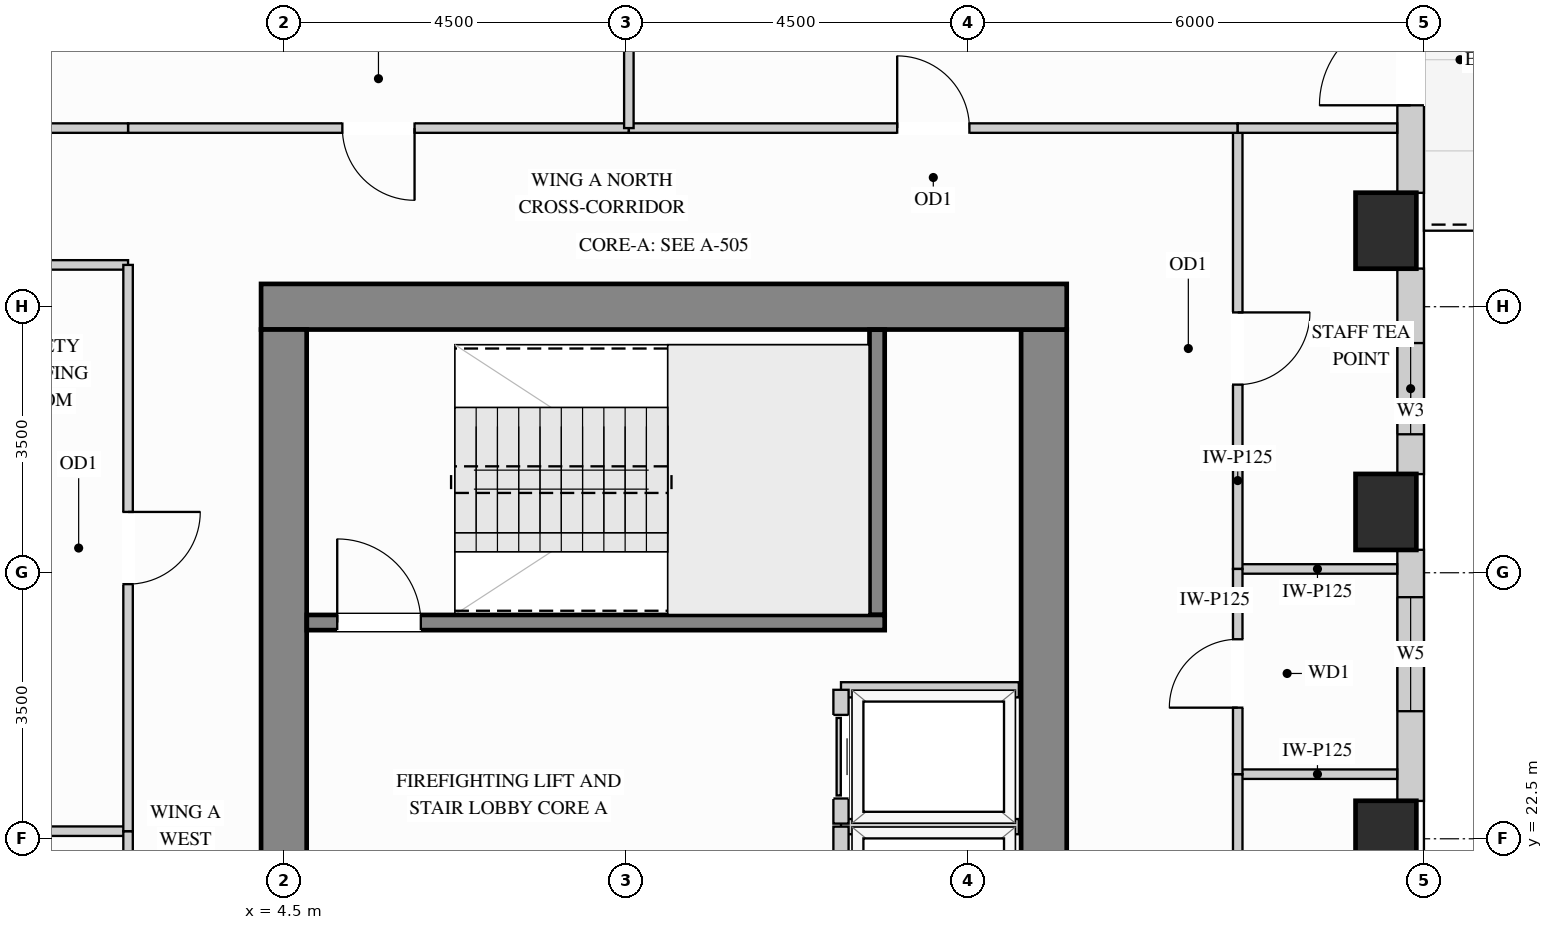
"""IFC4 building model, lengths in metres.
Left out: names, types, materials, properties, quantities, classifications, styles, units other than length and angle.
Written with IfcOpenShell. Run it as: python <this file> out.ifc"""

import sys

from ifc_helpers import new_model, si_unit, direction, frame, frame_2d, origin, origin_2d, place, context, subcontext, project, spatial, rectangle, extrude, source, transform, mapped, element, fill, save


model = new_model("IFC4")
c1 = context("Model", 3, precision=1e-05, world=origin(), true_north=direction((0.0, 1.0)))
c2 = subcontext(c1, "Body", "Model", "MODEL_VIEW")
j1 = project(units=[si_unit("LENGTHUNIT", "METRE"), si_unit("PLANEANGLEUNIT", "RADIAN")], contexts=[c1])
p1 = place(None, origin())
s1 = spatial("IfcSite", under=j1, at=p1, CompositionType="ELEMENT")
p2 = place(p1, origin())
s2 = spatial("IfcBuilding", under=s1, at=p2, CompositionType="ELEMENT")
p3 = place(p2, frame((0.0, 0.0, 157.5)))
s3 = spatial("IfcBuildingStorey", under=s2, at=p3, CompositionType="ELEMENT", Elevation=157.5)
m1 = source(origin(), c2, "Body", "SweptSolid", [
    extrude(rectangle(XDim=0.8, YDim=1.0, at=origin_2d()), origin(), (0.0, 0.0, 1.0), 3.4),
])
for number, where, z_axis, x_axis in (
    (1, (19.0, 22.5, 0.0), (0.0, 0.0, 1.0), (1.0, 0.0, 0.0)),
    (2, (19.0, 26.8, 0.0), (0.0, 0.0, 1.0), (1.0, 0.0, 0.0)),
    (3, (19.0, 30.5, 0.0), (0.0, 0.0, 1.0), (1.0, 0.0, 0.0)),
):
    element("IfcColumn", number, at=place(p3, frame(where, z_axis=z_axis, x_axis=x_axis)), inside=s3, PredefinedType="COLUMN", context=c2, shape_type="MappedRepresentation", body=[
        mapped(m1, transform((0.0, 0.0, 0.0), x_axis=(1.0, 0.0, 0.0), y_axis=(0.0, 1.0, 0.0), z_axis=(0.0, 0.0, 1.0))),
    ])
m2 = source(origin(), c2, "Body", "SweptSolid", [
    extrude(rectangle(XDim=8.32, YDim=0.6, at=frame_2d((4.16, 0.0))), origin(), (0.0, 0.0, 1.0), 3.4),
])
p4 = place(p3, frame((14.5, 20.88, 0.0), z_axis=(0.0, 0.0, 1.0), x_axis=(0.0, 1.0, 0.0)))
e4 = element("IfcWall", 4, at=p4, inside=s3, PredefinedType="SHEAR", context=c2, shape_type="MappedRepresentation", body=[
    mapped(m2, transform((0.0, 0.0, 0.0), x_axis=(1.0, 0.0, 0.0), y_axis=(0.0, 1.0, 0.0), z_axis=(0.0, 0.0, 1.0))),
])
m3 = source(origin(), c2, "Body", "SweptSolid", [
    extrude(rectangle(XDim=10.6, YDim=0.6, at=frame_2d((5.3, 0.0))), origin(), (0.0, 0.0, 1.0), 3.4),
])
p5 = place(p3, frame((4.2, 29.5, 0.0), z_axis=(0.0, 0.0, 1.0), x_axis=(1.0, 0.0, 0.0)))
e5 = element("IfcWall", 5, at=p5, inside=s3, PredefinedType="SHEAR", context=c2, shape_type="MappedRepresentation", body=[
    mapped(m3, transform((0.0, 0.0, 0.0), x_axis=(1.0, 0.0, 0.0), y_axis=(0.0, 1.0, 0.0), z_axis=(0.0, 0.0, 1.0))),
])
m4 = source(origin(), c2, "Body", "SweptSolid", [
    extrude(rectangle(XDim=20.4, YDim=0.6, at=frame_2d((10.2, 0.0))), origin(), (0.0, 0.0, 1.0), 3.4),
])
p6 = place(p3, frame((4.5, 8.8, 0.0), z_axis=(0.0, 0.0, 1.0), x_axis=(0.0, 1.0, 0.0)))
e6 = element("IfcWall", 6, at=p6, inside=s3, PredefinedType="SHEAR", context=c2, shape_type="MappedRepresentation", body=[
    mapped(m4, transform((0.0, 0.0, 0.0), x_axis=(1.0, 0.0, 0.0), y_axis=(0.0, 1.0, 0.0), z_axis=(0.0, 0.0, 1.0))),
])
p7 = place(p3, frame((19.325, 22.998, 0.0), z_axis=(0.0, 0.0, 1.0), x_axis=(0.0, 1.0, 0.0)))
e7 = element("IfcWall", 7, at=p7, inside=s3, PredefinedType="SOLIDWALL", context=c2, shape_type="SweptSolid", body=[
    extrude(rectangle(XDim=3.304, YDim=0.35, at=frame_2d((1.652, 0.0))), origin(), (0.0, 0.0, 1.0), 2.612),
])
p8 = place(p7, frame((1.18, 0.0, 0.78)))
e8 = element("IfcOpeningElement", 8, at=p8, cuts=e7, PredefinedType="OPENING", context=c2, shape_type="SweptSolid", body=[
    extrude(rectangle(XDim=1.5, YDim=1.652, at=frame_2d((0.75, 0.826))), frame((0.0, 0.185, 0.0), z_axis=(0.0, -1.0, 0.0), x_axis=(1.0, 0.0, 0.0)), (0.0, 0.0, 1.0), 0.37),
])
p9 = place(p3, frame((19.325, 27.298, 0.0), z_axis=(0.0, 0.0, 1.0), x_axis=(0.0, 1.0, 0.0)))
e9 = element("IfcWall", 9, at=p9, inside=s3, PredefinedType="SOLIDWALL", context=c2, shape_type="SweptSolid", body=[
    extrude(rectangle(XDim=2.704, YDim=0.35, at=frame_2d((1.352, 0.0))), origin(), (0.0, 0.0, 1.0), 2.612),
])
p10 = place(p9, frame((0.524, 0.0, 0.78)))
e10 = element("IfcOpeningElement", 10, at=p10, cuts=e9, PredefinedType="OPENING", context=c2, shape_type="SweptSolid", body=[
    extrude(rectangle(XDim=1.2, YDim=1.652, at=frame_2d((0.6, 0.826))), frame((0.0, 0.185, 0.0), z_axis=(0.0, -1.0, 0.0), x_axis=(1.0, 0.0, 0.0)), (0.0, 0.0, 1.0), 0.37),
])
p11 = place(p3, frame((19.325, 30.998, 0.0), z_axis=(0.0, 0.0, 1.0), x_axis=(0.0, 1.0, 0.0)))
e11 = element("IfcWall", 11, at=p11, inside=s3, PredefinedType="SOLIDWALL", context=c2, shape_type="SweptSolid", body=[
    extrude(rectangle(XDim=3.504, YDim=0.35, at=frame_2d((1.752, 0.0))), origin(), (0.0, 0.0, 1.0), 2.612),
])
p12 = place(p11, frame((1.152, 0.0, 0.0)))
e12 = element("IfcOpeningElement", 12, at=p12, cuts=e11, PredefinedType="OPENING", context=c2, shape_type="SweptSolid", body=[
    extrude(rectangle(XDim=1.2, YDim=2.15, at=frame_2d((0.6, 1.075))), frame((0.0, 0.185, 0.0), z_axis=(0.0, -1.0, 0.0), x_axis=(1.0, 0.0, 0.0)), (0.0, 0.0, 1.0), 0.37),
])
m5 = source(origin(), c2, "Body", "SweptSolid", [
    extrude(rectangle(XDim=2.098, YDim=0.125, at=frame_2d((1.049, 0.0))), origin(), (0.0, 0.0, 1.0), 3.385),
])
for number, where, z_axis, x_axis in (
    (13, (17.05, 23.35, 0.0), (0.0, 0.0, 1.0), (1.0, 0.0, 0.0)),
    (14, (17.05, 26.05, 0.0), (0.0, 0.0, 1.0), (1.0, 0.0, 0.0)),
):
    element("IfcWall", number, at=place(p3, frame(where, z_axis=z_axis, x_axis=x_axis)), inside=s3, PredefinedType="PARTITIONING", context=c2, shape_type="MappedRepresentation", body=[
        mapped(m5, transform((0.0, 0.0, 0.0), x_axis=(1.0, 0.0, 0.0), y_axis=(0.0, 1.0, 0.0), z_axis=(0.0, 0.0, 1.0))),
    ])
p13 = place(p3, frame((17.05, 16.7, 0.0), z_axis=(0.0, 0.0, 1.0), x_axis=(0.0, 1.0, 0.0)))
e15 = element("IfcWall", 15, at=p13, inside=s3, PredefinedType="PARTITIONING", context=c2, shape_type="SweptSolid", body=[
    extrude(rectangle(XDim=6.65, YDim=0.125, at=frame_2d((3.325, 0.0))), origin(), (0.0, 0.0, 1.0), 3.385),
])
p14 = place(p13, frame((2.85, 0.0, 0.0)))
e16 = element("IfcOpeningElement", 16, at=p14, cuts=e15, PredefinedType="OPENING", context=c2, shape_type="SweptSolid", body=[
    extrude(rectangle(XDim=0.95, YDim=2.15, at=frame_2d((0.475, 1.075))), frame((0.0, 0.073, 0.0), z_axis=(0.0, -1.0, 0.0), x_axis=(1.0, 0.0, 0.0)), (0.0, 0.0, 1.0), 0.145),
])
p15 = place(p3, frame((17.05, 26.05, 0.0), z_axis=(0.0, 0.0, 1.0), x_axis=(0.0, 1.0, 0.0)))
e17 = element("IfcWall", 17, at=p15, inside=s3, PredefinedType="PARTITIONING", context=c2, shape_type="SweptSolid", body=[
    extrude(rectangle(XDim=5.8, YDim=0.125, at=frame_2d((2.9, 0.0))), origin(), (0.0, 0.0, 1.0), 3.385),
])
p16 = place(p15, frame((2.425, 0.0, 0.0)))
e18 = element("IfcOpeningElement", 18, at=p16, cuts=e17, PredefinedType="OPENING", context=c2, shape_type="SweptSolid", body=[
    extrude(rectangle(XDim=0.95, YDim=2.15, at=frame_2d((0.475, 1.075))), frame((0.0, 0.073, 0.0), z_axis=(0.0, -1.0, 0.0), x_axis=(1.0, 0.0, 0.0)), (0.0, 0.0, 1.0), 0.145),
])
p17 = place(p3, frame((17.05, 23.35, 0.0), z_axis=(0.0, 0.0, 1.0), x_axis=(0.0, 1.0, 0.0)))
e19 = element("IfcWall", 19, at=p17, inside=s3, PredefinedType="PARTITIONING", context=c2, shape_type="SweptSolid", body=[
    extrude(rectangle(XDim=2.7, YDim=0.125, at=frame_2d((1.35, 0.0))), origin(), (0.0, 0.0, 1.0), 3.385),
])
p18 = place(p17, frame((0.875, 0.0, 0.0)))
e20 = element("IfcOpeningElement", 20, at=p18, cuts=e19, PredefinedType="OPENING", context=c2, shape_type="SweptSolid", body=[
    extrude(rectangle(XDim=0.9, YDim=2.15, at=frame_2d((0.45, 1.075))), frame((0.0, 0.073, 0.0), z_axis=(0.0, -1.0, 0.0), x_axis=(1.0, 0.0, 0.0)), (0.0, 0.0, 1.0), 0.145),
])
p19 = place(p3, frame((2.45, 31.85, 0.0), z_axis=(0.0, 0.0, 1.0), x_axis=(1.0, 0.0, 0.0)))
e21 = element("IfcWall", 21, at=p19, inside=s3, PredefinedType="PARTITIONING", context=c2, shape_type="SweptSolid", body=[
    extrude(rectangle(XDim=6.589, YDim=0.125, at=frame_2d((3.294, 0.0))), origin(), (0.0, 0.0, 1.0), 2.848),
])
p20 = place(p19, frame((2.82, 0.0, 0.0)))
e22 = element("IfcOpeningElement", 22, at=p20, cuts=e21, PredefinedType="OPENING", context=c2, shape_type="SweptSolid", body=[
    extrude(rectangle(XDim=0.95, YDim=2.15, at=frame_2d((0.475, 1.075))), frame((0.0, 0.073, 0.0), z_axis=(0.0, -1.0, 0.0), x_axis=(1.0, 0.0, 0.0)), (0.0, 0.0, 1.0), 0.145),
])
p21 = place(p3, frame((9.039, 31.85, 0.0), z_axis=(0.0, 0.0, 1.0), x_axis=(1.0, 0.0, 0.0)))
e23 = element("IfcWall", 23, at=p21, inside=s3, PredefinedType="PARTITIONING", context=c2, shape_type="SweptSolid", body=[
    extrude(rectangle(XDim=8.011, YDim=0.125, at=frame_2d((4.005, 0.0))), origin(), (0.0, 0.0, 1.0), 2.848),
])
p22 = place(p21, frame((3.531, 0.0, 0.0)))
e24 = element("IfcOpeningElement", 24, at=p22, cuts=e23, PredefinedType="OPENING", context=c2, shape_type="SweptSolid", body=[
    extrude(rectangle(XDim=0.95, YDim=2.15, at=frame_2d((0.475, 1.075))), frame((0.0, 0.073, 0.0), z_axis=(0.0, -1.0, 0.0), x_axis=(1.0, 0.0, 0.0)), (0.0, 0.0, 1.0), 0.145),
])
m6 = source(origin(), c2, "Body", "SweptSolid", [
    extrude(rectangle(XDim=2.098, YDim=0.125, at=frame_2d((1.049, 0.0))), origin(), (0.0, 0.0, 1.0), 2.848),
])
for number, where, z_axis, x_axis in (
    (25, (17.05, 31.85, 0.0), (0.0, 0.0, 1.0), (1.0, 0.0, 0.0)),
    (26, (0.352, 31.85, 0.0), (0.0, 0.0, 1.0), (1.0, 0.0, 0.0)),
):
    element("IfcWall", number, at=place(p3, frame(where, z_axis=z_axis, x_axis=x_axis)), inside=s3, PredefinedType="PARTITIONING", context=c2, shape_type="MappedRepresentation", body=[
        mapped(m6, transform((0.0, 0.0, 0.0), x_axis=(1.0, 0.0, 0.0), y_axis=(0.0, 1.0, 0.0), z_axis=(0.0, 0.0, 1.0))),
    ])
m7 = source(origin(), c2, "Body", "SweptSolid", [
    extrude(rectangle(XDim=5.53, YDim=0.125, at=frame_2d((2.765, 0.0))), origin(), (0.0, 0.0, 1.0), 3.385),
])
p23 = place(p3, frame((9.039, 31.85, 0.0), z_axis=(0.0, 0.0, 1.0), x_axis=(0.0, 1.0, 0.0)))
e27 = element("IfcWall", 27, at=p23, inside=s3, PredefinedType="PARTITIONING", context=c2, shape_type="MappedRepresentation", body=[
    mapped(m7, transform((0.0, 0.0, 0.0), x_axis=(1.0, 0.0, 0.0), y_axis=(0.0, 1.0, 0.0), z_axis=(0.0, 0.0, 1.0))),
])
m8 = source(origin(), c2, "Body", "SweptSolid", [
    extrude(rectangle(XDim=1.33, YDim=0.125, at=frame_2d((0.665, 0.0))), origin(), (0.0, 0.0, 1.0), 3.385),
])
for number, where, z_axis, x_axis in (
    (28, (1.12, 30.05, 0.0), (0.0, 0.0, 1.0), (1.0, 0.0, 0.0)),
    (29, (1.12, 22.6, 0.0), (0.0, 0.0, 1.0), (1.0, 0.0, 0.0)),
):
    element("IfcWall", number, at=place(p3, frame(where, z_axis=z_axis, x_axis=x_axis)), inside=s3, PredefinedType="PARTITIONING", context=c2, shape_type="MappedRepresentation", body=[
        mapped(m8, transform((0.0, 0.0, 0.0), x_axis=(1.0, 0.0, 0.0), y_axis=(0.0, 1.0, 0.0), z_axis=(0.0, 0.0, 1.0))),
    ])
p24 = place(p3, frame((2.45, 15.1, 0.0), z_axis=(0.0, 0.0, 1.0), x_axis=(0.0, 1.0, 0.0)))
e30 = element("IfcWall", 30, at=p24, inside=s3, PredefinedType="PARTITIONING", context=c2, shape_type="SweptSolid", body=[
    extrude(rectangle(XDim=7.5, YDim=0.125, at=frame_2d((3.75, 0.0))), origin(), (0.0, 0.0, 1.0), 3.385),
])
p25 = place(p24, frame((3.275, 0.0, 0.0)))
e31 = element("IfcOpeningElement", 31, at=p25, cuts=e30, PredefinedType="OPENING", context=c2, shape_type="SweptSolid", body=[
    extrude(rectangle(XDim=0.95, YDim=2.15, at=frame_2d((0.475, 1.075))), frame((0.0, 0.073, 0.0), z_axis=(0.0, -1.0, 0.0), x_axis=(1.0, 0.0, 0.0)), (0.0, 0.0, 1.0), 0.145),
])
p26 = place(p3, frame((2.45, 22.6, 0.0), z_axis=(0.0, 0.0, 1.0), x_axis=(0.0, 1.0, 0.0)))
e32 = element("IfcWall", 32, at=p26, inside=s3, PredefinedType="PARTITIONING", context=c2, shape_type="SweptSolid", body=[
    extrude(rectangle(XDim=7.45, YDim=0.125, at=frame_2d((3.725, 0.0))), origin(), (0.0, 0.0, 1.0), 3.385),
])
p27 = place(p26, frame((3.25, 0.0, 0.0)))
e33 = element("IfcOpeningElement", 33, at=p27, cuts=e32, PredefinedType="OPENING", context=c2, shape_type="SweptSolid", body=[
    extrude(rectangle(XDim=0.95, YDim=2.15, at=frame_2d((0.475, 1.075))), frame((0.0, 0.073, 0.0), z_axis=(0.0, -1.0, 0.0), x_axis=(1.0, 0.0, 0.0)), (0.0, 0.0, 1.0), 0.145),
])
m9 = source(origin(), c2, "Body", "SweptSolid", [
    extrude(rectangle(XDim=2.34, YDim=0.2, at=frame_2d((1.17, 0.0))), origin(), (0.0, 0.0, 1.0), 3.385),
])
p28 = place(p3, frame((11.83, 22.66, 0.0), z_axis=(0.0, 0.0, 1.0), x_axis=(1.0, 0.0, 0.0)))
e34 = element("IfcWall", 34, at=p28, inside=s3, PredefinedType="PARTITIONING", context=c2, shape_type="MappedRepresentation", body=[
    mapped(m9, transform((0.0, 0.0, 0.0), x_axis=(1.0, 0.0, 0.0), y_axis=(0.0, 1.0, 0.0), z_axis=(0.0, 0.0, 1.0))),
])
p29 = place(p3, frame((11.83, 20.9, 0.0), z_axis=(0.0, 0.0, 1.0), x_axis=(0.0, 1.0, 0.0)))
e35 = element("IfcWall", 35, at=p29, inside=s3, PredefinedType="PARTITIONING", context=c2, shape_type="SweptSolid", body=[
    extrude(rectangle(XDim=1.76, YDim=0.2, at=frame_2d((0.88, 0.0))), origin(), (0.0, 0.0, 1.0), 3.385),
])
p30 = place(p29, frame((0.33, 0.0, 0.0)))
e36 = element("IfcOpeningElement", 36, at=p30, cuts=e35, PredefinedType="OPENING", context=c2, shape_type="SweptSolid", body=[
    extrude(rectangle(XDim=1.1, YDim=2.2, at=frame_2d((0.55, 1.1))), frame((0.0, 0.11, 0.0), z_axis=(0.0, -1.0, 0.0), x_axis=(1.0, 0.0, 0.0)), (0.0, 0.0, 1.0), 0.22),
])
p31 = place(p3, frame((11.83, 24.46, 0.0), z_axis=(0.0, 0.0, 1.0), x_axis=(1.0, 0.0, 0.0)))
e37 = element("IfcWall", 37, at=p31, inside=s3, PredefinedType="PARTITIONING", context=c2, shape_type="MappedRepresentation", body=[
    mapped(m9, transform((0.0, 0.0, 0.0), x_axis=(1.0, 0.0, 0.0), y_axis=(0.0, 1.0, 0.0), z_axis=(0.0, 0.0, 1.0))),
])
p32 = place(p3, frame((11.83, 22.7, 0.0), z_axis=(0.0, 0.0, 1.0), x_axis=(0.0, 1.0, 0.0)))
e38 = element("IfcWall", 38, at=p32, inside=s3, PredefinedType="PARTITIONING", context=c2, shape_type="SweptSolid", body=[
    extrude(rectangle(XDim=1.76, YDim=0.2, at=frame_2d((0.88, 0.0))), origin(), (0.0, 0.0, 1.0), 3.385),
])
p33 = place(p32, frame((0.33, 0.0, 0.0)))
e39 = element("IfcOpeningElement", 39, at=p33, cuts=e38, PredefinedType="OPENING", context=c2, shape_type="SweptSolid", body=[
    extrude(rectangle(XDim=1.1, YDim=2.2, at=frame_2d((0.55, 1.1))), frame((0.0, 0.11, 0.0), z_axis=(0.0, -1.0, 0.0), x_axis=(1.0, 0.0, 0.0)), (0.0, 0.0, 1.0), 0.22),
])
m10 = source(origin(), c2, "Body", "SweptSolid", [
    extrude(rectangle(XDim=3.753, YDim=0.2, at=frame_2d((1.876, 0.0))), origin(), (0.0, 0.0, 1.0), 3.4),
])
p34 = place(p3, frame((12.305, 25.445, 0.0), z_axis=(0.0, 0.0, 1.0), x_axis=(0.0, 1.0, 0.0)))
e40 = element("IfcWall", 40, at=p34, inside=s3, PredefinedType="SHEAR", context=c2, shape_type="MappedRepresentation", body=[
    mapped(m10, transform((0.0, 0.0, 0.0), x_axis=(1.0, 0.0, 0.0), y_axis=(0.0, 1.0, 0.0), z_axis=(0.0, 0.0, 1.0))),
])
p35 = place(p3, frame((4.802, 25.345, 0.0), z_axis=(0.0, 0.0, 1.0), x_axis=(1.0, 0.0, 0.0)))
e41 = element("IfcWall", 41, at=p35, inside=s3, PredefinedType="SHEAR", context=c2, shape_type="SweptSolid", body=[
    extrude(rectangle(XDim=7.603, YDim=0.2, at=frame_2d((3.802, 0.0))), origin(), (0.0, 0.0, 1.0), 3.4),
])
p36 = place(p35, frame((0.4, 0.0, 0.0)))
e42 = element("IfcOpeningElement", 42, at=p36, cuts=e41, PredefinedType="OPENING", context=c2, shape_type="SweptSolid", body=[
    extrude(rectangle(XDim=1.1, YDim=2.15, at=frame_2d((0.55, 1.075))), frame((0.0, 0.11, 0.0), z_axis=(0.0, -1.0, 0.0), x_axis=(1.0, 0.0, 0.0)), (0.0, 0.0, 1.0), 0.22),
])
m11 = source(origin(), c2, "Body", "SweptSolid", [
    extrude(rectangle(XDim=1.2, YDim=2.15, at=frame_2d((0.6, 1.075))), frame((0.0, 0.025, 0.0), z_axis=(0.0, -1.0, 0.0), x_axis=(1.0, 0.0, 0.0)), (0.0, 0.0, 1.0), 0.05),
])
p37 = place(p12, frame((1.2, 0.0, 0.0), z_axis=(0.0, 0.0, 1.0), x_axis=(-1.0, 0.0, 0.0)))
e43 = element("IfcDoor", 43, at=p37, inside=s3, OperationType="SINGLE_SWING_LEFT", PredefinedType="DOOR", context=c2, shape_type="MappedRepresentation", body=[
    mapped(m11, transform((0.0, 0.0, 0.0), x_axis=(1.0, 0.0, 0.0), y_axis=(0.0, 1.0, 0.0), z_axis=(0.0, 0.0, 1.0))),
])
fill(e12, e43)
m12 = source(origin(), c2, "Body", "SweptSolid", [
    extrude(rectangle(XDim=1.1, YDim=2.2, at=frame_2d((0.55, 1.1))), frame((0.0, 0.025, 0.0), z_axis=(0.0, -1.0, 0.0), x_axis=(1.0, 0.0, 0.0)), (0.0, 0.0, 1.0), 0.05),
])
p38 = place(p33, origin())
e44 = element("IfcDoor", 44, at=p38, inside=s3, OperationType="SLIDING_TO_LEFT", PredefinedType="DOOR", context=c2, shape_type="MappedRepresentation", body=[
    mapped(m12, transform((0.0, 0.0, 0.0), x_axis=(1.0, 0.0, 0.0), y_axis=(0.0, 1.0, 0.0), z_axis=(0.0, 0.0, 1.0))),
])
fill(e39, e44)
m13 = source(origin(), c2, "Body", "SweptSolid", [
    extrude(rectangle(XDim=0.95, YDim=2.15, at=frame_2d((0.475, 1.075))), frame((0.0, 0.025, 0.0), z_axis=(0.0, -1.0, 0.0), x_axis=(1.0, 0.0, 0.0)), (0.0, 0.0, 1.0), 0.05),
])
p39 = place(p16, origin())
e45 = element("IfcDoor", 45, at=p39, inside=s3, OperationType="SINGLE_SWING_RIGHT", PredefinedType="DOOR", context=c2, shape_type="MappedRepresentation", body=[
    mapped(m13, transform((0.0, 0.0, 0.0), x_axis=(1.0, 0.0, 0.0), y_axis=(0.0, 1.0, 0.0), z_axis=(0.0, 0.0, 1.0))),
])
fill(e18, e45)
p40 = place(p20, origin())
e46 = element("IfcDoor", 46, at=p40, inside=s3, OperationType="SINGLE_SWING_RIGHT", PredefinedType="DOOR", context=c2, shape_type="MappedRepresentation", body=[
    mapped(m13, transform((0.0, 0.0, 0.0), x_axis=(1.0, 0.0, 0.0), y_axis=(0.0, 1.0, 0.0), z_axis=(0.0, 0.0, 1.0))),
])
fill(e22, e46)
p41 = place(p22, origin())
e47 = element("IfcDoor", 47, at=p41, inside=s3, OperationType="SINGLE_SWING_LEFT", PredefinedType="DOOR", context=c2, shape_type="MappedRepresentation", body=[
    mapped(m13, transform((0.0, 0.0, 0.0), x_axis=(1.0, 0.0, 0.0), y_axis=(0.0, 1.0, 0.0), z_axis=(0.0, 0.0, 1.0))),
])
fill(e24, e47)
p42 = place(p27, origin())
e48 = element("IfcDoor", 48, at=p42, inside=s3, OperationType="SINGLE_SWING_RIGHT", PredefinedType="DOOR", context=c2, shape_type="MappedRepresentation", body=[
    mapped(m13, transform((0.0, 0.0, 0.0), x_axis=(1.0, 0.0, 0.0), y_axis=(0.0, 1.0, 0.0), z_axis=(0.0, 0.0, 1.0))),
])
fill(e33, e48)
m14 = source(origin(), c2, "Body", "SweptSolid", [
    extrude(rectangle(XDim=1.1, YDim=2.15, at=frame_2d((0.55, 1.075))), frame((0.0, 0.025, 0.0), z_axis=(0.0, -1.0, 0.0), x_axis=(1.0, 0.0, 0.0)), (0.0, 0.0, 1.0), 0.05),
])
p43 = place(p36, origin())
e49 = element("IfcDoor", 49, at=p43, inside=s3, OperationType="SINGLE_SWING_LEFT", PredefinedType="DOOR", context=c2, shape_type="MappedRepresentation", body=[
    mapped(m14, transform((0.0, 0.0, 0.0), x_axis=(1.0, 0.0, 0.0), y_axis=(0.0, 1.0, 0.0), z_axis=(0.0, 0.0, 1.0))),
])
fill(e42, e49)
m15 = source(origin(), c2, "Body", "SweptSolid", [
    extrude(rectangle(XDim=0.9, YDim=2.15, at=frame_2d((0.45, 1.075))), frame((0.0, 0.025, 0.0), z_axis=(0.0, -1.0, 0.0), x_axis=(1.0, 0.0, 0.0)), (0.0, 0.0, 1.0), 0.05),
])
p44 = place(p18, origin())
e50 = element("IfcDoor", 50, at=p44, inside=s3, OperationType="SINGLE_SWING_LEFT", PredefinedType="DOOR", context=c2, shape_type="MappedRepresentation", body=[
    mapped(m15, transform((0.0, 0.0, 0.0), x_axis=(1.0, 0.0, 0.0), y_axis=(0.0, 1.0, 0.0), z_axis=(0.0, 0.0, 1.0))),
])
fill(e20, e50)
m16 = source(origin(), c2, "Body", "SweptSolid", [
    extrude(rectangle(XDim=1.2, YDim=1.652, at=frame_2d((0.6, 0.826))), frame((0.0, 0.03, 0.0), z_axis=(0.0, -1.0, 0.0), x_axis=(1.0, 0.0, 0.0)), (0.0, 0.0, 1.0), 0.06),
])
p45 = place(p10, origin())
e51 = element("IfcWindow", 51, at=p45, inside=s3, PartitioningType="SINGLE_PANEL", PredefinedType="WINDOW", context=c2, shape_type="MappedRepresentation", body=[
    mapped(m16, transform((0.0, 0.0, 0.0), x_axis=(1.0, 0.0, 0.0), y_axis=(0.0, 1.0, 0.0), z_axis=(0.0, 0.0, 1.0))),
])
fill(e10, e51)
m17 = source(origin(), c2, "Body", "SweptSolid", [
    extrude(rectangle(XDim=1.5, YDim=1.652, at=frame_2d((0.75, 0.826))), frame((0.0, 0.03, 0.0), z_axis=(0.0, -1.0, 0.0), x_axis=(1.0, 0.0, 0.0)), (0.0, 0.0, 1.0), 0.06),
])
p46 = place(p8, origin())
e52 = element("IfcWindow", 52, at=p46, inside=s3, PartitioningType="SINGLE_PANEL", PredefinedType="WINDOW", context=c2, shape_type="MappedRepresentation", body=[
    mapped(m17, transform((0.0, 0.0, 0.0), x_axis=(1.0, 0.0, 0.0), y_axis=(0.0, 1.0, 0.0), z_axis=(0.0, 0.0, 1.0))),
])
fill(e8, e52)
save(model, sys.argv[1])
